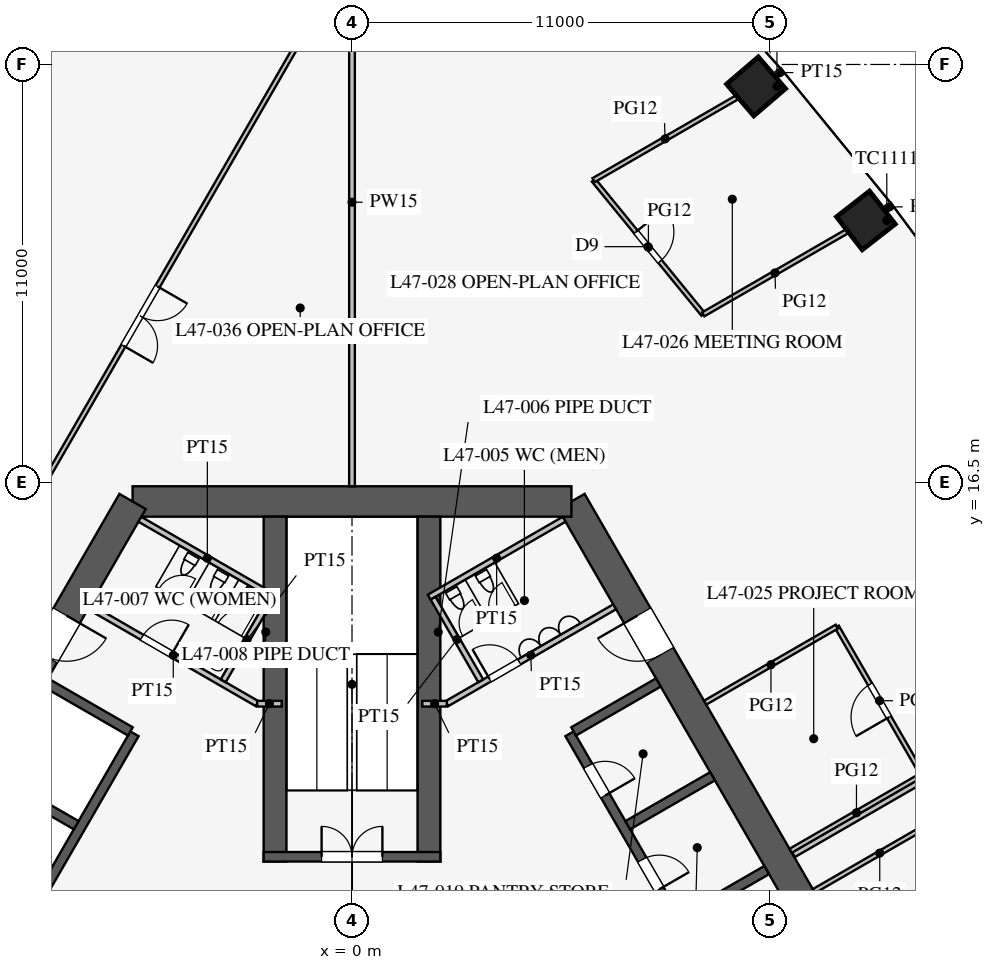
"""IFC4 building model, lengths in metres.
Left out: names, types, materials, properties, quantities, classifications, styles, units other than length and angle.
Written with IfcOpenShell. Run it as: python <this file> out.ifc"""

import sys

from ifc_helpers import new_model, si_unit, direction, frame, frame_2d, origin, origin_2d, place, context, subcontext, project, spatial, rectangle, extrude, element, fill, save


model = new_model("IFC4")
c1 = context("Model", 3, precision=1e-05, world=origin(), true_north=direction((0.0, 1.0)))
c2 = subcontext(c1, "Body", "Model", "MODEL_VIEW")
j1 = project(units=[si_unit("LENGTHUNIT", "METRE"), si_unit("PLANEANGLEUNIT", "RADIAN")], contexts=[c1])
p1 = place(None, origin())
s1 = spatial("IfcSite", under=j1, at=p1, CompositionType="ELEMENT")
p2 = place(p1, origin())
s2 = spatial("IfcBuilding", under=s1, at=p2, CompositionType="ELEMENT")
p3 = place(p2, frame((0.0, 0.0, 206.5)))
s3 = spatial("IfcBuildingStorey", under=s2, at=p3, CompositionType="ELEMENT", Elevation=206.5)
for number, where, z_axis, x_axis in (
    (1, (13.522, 23.396, 0.0), (0.0, 0.0, 1.0), (-0.615, 0.789, 0.0)),
    (2, (10.632, 26.923, 0.0), (0.0, 0.0, 1.0), (-0.651, 0.759, 0.0)),
):
    element("IfcColumn", number, at=place(p3, frame(where, z_axis=z_axis, x_axis=x_axis)), inside=s3, PredefinedType="COLUMN", context=c2, shape_type="SweptSolid", body=[
        extrude(rectangle(XDim=1.1, YDim=1.1, at=origin_2d()), origin(), (0.0, 0.0, 1.0), 4.2),
    ])
p4 = place(p3, frame((16.743, -3.0, 0.0), z_axis=(0.0, 0.0, 1.0), x_axis=(-0.500002442456, 0.866023993627, 0.0)))
e3 = element("IfcWall", 3, at=p4, inside=s3, PredefinedType="SHEAR", context=c2, shape_type="SweptSolid", body=[
    extrude(rectangle(XDim=21.939, YDim=0.8, at=frame_2d((10.97, 0.0))), origin(), (0.0, 0.0, 1.0), 4.2),
])
p5 = place(p4, frame((17.27, 0.0, 0.0)))
e4 = element("IfcOpeningElement", 4, at=p5, cuts=e3, PredefinedType="OPENING", context=c2, shape_type="SweptSolid", body=[
    extrude(rectangle(XDim=1.2, YDim=2.1, at=frame_2d((0.6, 1.05))), frame((0.0, 0.41, 0.0), z_axis=(0.0, -1.0, 0.0), x_axis=(1.0, 0.0, 0.0)), (0.0, 0.0, 1.0), 0.82),
])
p6 = place(p4, frame((3.47, 0.0, 0.0)))
e5 = element("IfcOpeningElement", 5, at=p6, cuts=e3, PredefinedType="OPENING", context=c2, shape_type="SweptSolid", body=[
    extrude(rectangle(XDim=1.2, YDim=2.1, at=frame_2d((0.6, 1.05))), frame((0.0, 0.41, 0.0), z_axis=(0.0, -1.0, 0.0), x_axis=(1.0, 0.0, 0.0)), (0.0, 0.0, 1.0), 0.82),
])
p7 = place(p3, frame((5.773, 16.0, 0.0), z_axis=(0.0, 0.0, 1.0), x_axis=(-1.0, 0.0, 0.0)))
e6 = element("IfcWall", 6, at=p7, inside=s3, PredefinedType="SHEAR", context=c2, shape_type="SweptSolid", body=[
    extrude(rectangle(XDim=11.547, YDim=0.8, at=frame_2d((5.773, 0.0))), origin(), (0.0, 0.0, 1.0), 4.2),
])
p8 = place(p3, frame((-5.773, 16.0, 0.0), z_axis=(0.0, 0.0, 1.0), x_axis=(-0.500002442456, -0.866023993627, 0.0)))
e7 = element("IfcWall", 7, at=p8, inside=s3, PredefinedType="SHEAR", context=c2, shape_type="SweptSolid", body=[
    extrude(rectangle(XDim=21.939, YDim=0.8, at=frame_2d((10.97, 0.0))), origin(), (0.0, 0.0, 1.0), 4.2),
])
p9 = place(p8, frame((17.27, 0.0, 0.0)))
e8 = element("IfcOpeningElement", 8, at=p9, cuts=e7, PredefinedType="OPENING", context=c2, shape_type="SweptSolid", body=[
    extrude(rectangle(XDim=1.2, YDim=2.1, at=frame_2d((0.6, 1.05))), frame((0.0, 0.41, 0.0), z_axis=(0.0, -1.0, 0.0), x_axis=(1.0, 0.0, 0.0)), (0.0, 0.0, 1.0), 0.82),
])
p10 = place(p8, frame((3.47, 0.0, 0.0)))
e9 = element("IfcOpeningElement", 9, at=p10, cuts=e7, PredefinedType="OPENING", context=c2, shape_type="SweptSolid", body=[
    extrude(rectangle(XDim=1.2, YDim=2.1, at=frame_2d((0.6, 1.05))), frame((0.0, 0.41, 0.0), z_axis=(0.0, -1.0, 0.0), x_axis=(1.0, 0.0, 0.0)), (0.0, 0.0, 1.0), 0.82),
])
p11 = place(p3, frame((11.424, 0.014, 0.0), z_axis=(0.0, 0.0, 1.0), x_axis=(-0.500001763848, 0.866024385424, 0.0)))
e10 = element("IfcWall", 10, at=p11, inside=s3, PredefinedType="SHEAR", context=c2, shape_type="SweptSolid", body=[
    extrude(rectangle(XDim=11.4, YDim=0.25, at=frame_2d((5.7, 0.0))), origin(), (0.0, 0.0, 1.0), 4.2),
])
p12 = place(p11, frame((0.975, 0.0, 0.0)))
e11 = element("IfcOpeningElement", 11, at=p12, cuts=e10, PredefinedType="OPENING", context=c2, shape_type="SweptSolid", body=[
    extrude(rectangle(XDim=0.9, YDim=2.1, at=frame_2d((0.45, 1.05))), frame((0.0, 0.135, 0.0), z_axis=(0.0, -1.0, 0.0), x_axis=(1.0, 0.0, 0.0)), (0.0, 0.0, 1.0), 0.27),
])
p13 = place(p11, frame((3.825, 0.0, 0.0)))
e12 = element("IfcOpeningElement", 12, at=p13, cuts=e10, PredefinedType="OPENING", context=c2, shape_type="SweptSolid", body=[
    extrude(rectangle(XDim=0.9, YDim=2.1, at=frame_2d((0.45, 1.05))), frame((0.0, 0.135, 0.0), z_axis=(0.0, -1.0, 0.0), x_axis=(1.0, 0.0, 0.0)), (0.0, 0.0, 1.0), 0.27),
])
p14 = place(p11, frame((6.675, 0.0, 0.0)))
e13 = element("IfcOpeningElement", 13, at=p14, cuts=e10, PredefinedType="OPENING", context=c2, shape_type="SweptSolid", body=[
    extrude(rectangle(XDim=0.9, YDim=2.1, at=frame_2d((0.45, 1.05))), frame((0.0, 0.135, 0.0), z_axis=(0.0, -1.0, 0.0), x_axis=(1.0, 0.0, 0.0)), (0.0, 0.0, 1.0), 0.27),
])
p15 = place(p11, frame((9.525, 0.0, 0.0)))
e14 = element("IfcOpeningElement", 14, at=p15, cuts=e10, PredefinedType="OPENING", context=c2, shape_type="SweptSolid", body=[
    extrude(rectangle(XDim=0.9, YDim=2.1, at=frame_2d((0.45, 1.05))), frame((0.0, 0.135, 0.0), z_axis=(0.0, -1.0, 0.0), x_axis=(1.0, 0.0, 0.0)), (0.0, 0.0, 1.0), 0.27),
])
for number, where, z_axis, x_axis in (
    (15, (8.682, 5.012, 0.0), (0.0, 0.0, 1.0), (0.866, 0.5, 0.0)),
    (16, (7.257, 7.481, 0.0), (0.0, 0.0, 1.0), (0.866, 0.5, 0.0)),
):
    element("IfcWall", number, at=place(p3, frame(where, z_axis=z_axis, x_axis=x_axis)), inside=s3, PredefinedType="SHEAR", context=c2, shape_type="SweptSolid", body=[
        extrude(rectangle(XDim=2.575, YDim=0.25, at=frame_2d((1.288, 0.0))), origin(), (0.0, 0.0, 1.0), 4.2),
    ])
p16 = place(p3, frame((5.832, 9.949, 0.0), z_axis=(0.0, 0.0, 1.0), x_axis=(0.866029291668, 0.499993265928, 0.0)))
e17 = element("IfcWall", 17, at=p16, inside=s3, PredefinedType="SHEAR", context=c2, shape_type="SweptSolid", body=[
    extrude(rectangle(XDim=2.575, YDim=0.25, at=frame_2d((1.288, 0.0))), origin(), (0.0, 0.0, 1.0), 4.2),
])
p17 = place(p3, frame((-5.724, 9.886, 0.0), z_axis=(0.0, 0.0, 1.0), x_axis=(-0.500001763848, -0.866024385424, 0.0)))
e18 = element("IfcWall", 18, at=p17, inside=s3, PredefinedType="SHEAR", context=c2, shape_type="SweptSolid", body=[
    extrude(rectangle(XDim=11.4, YDim=0.25, at=frame_2d((5.7, 0.0))), origin(), (0.0, 0.0, 1.0), 4.2),
])
p18 = place(p17, frame((6.525, 0.0, 0.0)))
e19 = element("IfcOpeningElement", 19, at=p18, cuts=e18, PredefinedType="OPENING", context=c2, shape_type="SweptSolid", body=[
    extrude(rectangle(XDim=1.2, YDim=2.2, at=frame_2d((0.6, 1.1))), frame((0.0, 0.135, 0.0), z_axis=(0.0, -1.0, 0.0), x_axis=(1.0, 0.0, 0.0)), (0.0, 0.0, 1.0), 0.27),
])
p19 = place(p17, frame((9.375, 0.0, 0.0)))
e20 = element("IfcOpeningElement", 20, at=p19, cuts=e18, PredefinedType="OPENING", context=c2, shape_type="SweptSolid", body=[
    extrude(rectangle(XDim=1.2, YDim=2.2, at=frame_2d((0.6, 1.1))), frame((0.0, 0.135, 0.0), z_axis=(0.0, -1.0, 0.0), x_axis=(1.0, 0.0, 0.0)), (0.0, 0.0, 1.0), 0.27),
])
p20 = place(p3, frame((-5.832, 9.949, 0.0), z_axis=(0.0, 0.0, 1.0), x_axis=(-0.866029291668, 0.499993265928, 0.0)))
e21 = element("IfcWall", 21, at=p20, inside=s3, PredefinedType="SHEAR", context=c2, shape_type="SweptSolid", body=[
    extrude(rectangle(XDim=2.575, YDim=0.25, at=frame_2d((1.288, 0.0))), origin(), (0.0, 0.0, 1.0), 4.2),
])
p21 = place(p3, frame((-7.257, 7.481, 0.0), z_axis=(0.0, 0.0, 1.0), x_axis=(-0.866046643894, 0.499963209246, 0.0)))
e22 = element("IfcWall", 22, at=p21, inside=s3, PredefinedType="SHEAR", context=c2, shape_type="SweptSolid", body=[
    extrude(rectangle(XDim=2.575, YDim=0.25, at=frame_2d((1.288, 0.0))), origin(), (0.0, 0.0, 1.0), 4.2),
])
for number, where, z_axis, x_axis in (
    (23, (2.025, 6.525, 0.0), (0.0, 0.0, 1.0), (0.0, 1.0, 0.0)),
    (24, (-2.025, 6.525, 0.0), (0.0, 0.0, 1.0), (0.0, 1.0, 0.0)),
):
    element("IfcWall", number, at=place(p3, frame(where, z_axis=z_axis, x_axis=x_axis)), inside=s3, PredefinedType="SHEAR", context=c2, shape_type="SweptSolid", body=[
        extrude(rectangle(XDim=9.075, YDim=0.6, at=frame_2d((4.538, 0.0))), origin(), (0.0, 0.0, 1.0), 4.2),
    ])
p22 = place(p3, frame((2.325, 6.65, 0.0), z_axis=(0.0, 0.0, 1.0), x_axis=(-1.0, 0.0, 0.0)))
e25 = element("IfcWall", 25, at=p22, inside=s3, PredefinedType="SHEAR", context=c2, shape_type="SweptSolid", body=[
    extrude(rectangle(XDim=4.65, YDim=0.25, at=frame_2d((2.325, 0.0))), origin(), (0.0, 0.0, 1.0), 4.2),
])
p23 = place(p22, frame((1.525, 0.0, 0.0)))
e26 = element("IfcOpeningElement", 26, at=p23, cuts=e25, PredefinedType="OPENING", context=c2, shape_type="SweptSolid", body=[
    extrude(rectangle(XDim=1.6, YDim=2.1, at=frame_2d((0.8, 1.05))), frame((0.0, 0.135, 0.0), z_axis=(0.0, -1.0, 0.0), x_axis=(1.0, 0.0, 0.0)), (0.0, 0.0, 1.0), 0.27),
])
p24 = place(p3, frame((2.495, 10.678, 0.0), z_axis=(0.0, 0.0, 1.0), x_axis=(0.86602216432, 0.500005610874, 0.0)))
e27 = element("IfcWall", 27, at=p24, inside=s3, PredefinedType="PARTITIONING", context=c2, shape_type="SweptSolid", body=[
    extrude(rectangle(XDim=5.1, YDim=0.15, at=frame_2d((2.55, 0.0))), origin(), (0.0, 0.0, 1.0), 4.0),
])
p25 = place(p24, frame((1.3, 0.0, 0.0)))
e28 = element("IfcOpeningElement", 28, at=p25, cuts=e27, PredefinedType="OPENING", context=c2, shape_type="SweptSolid", body=[
    extrude(rectangle(XDim=0.9, YDim=2.1, at=frame_2d((0.45, 1.05))), frame((0.0, 0.085, 0.0), z_axis=(0.0, -1.0, 0.0), x_axis=(1.0, 0.0, 0.0)), (0.0, 0.0, 1.0), 0.17),
])
p26 = place(p3, frame((-2.495, 10.678, 0.0), z_axis=(0.0, 0.0, 1.0), x_axis=(-0.86602216432, 0.500005610874, 0.0)))
e29 = element("IfcWall", 29, at=p26, inside=s3, PredefinedType="PARTITIONING", context=c2, shape_type="SweptSolid", body=[
    extrude(rectangle(XDim=5.1, YDim=0.15, at=frame_2d((2.55, 0.0))), origin(), (0.0, 0.0, 1.0), 4.0),
])
p27 = place(p26, frame((2.6, 0.0, 0.0)))
e30 = element("IfcOpeningElement", 30, at=p27, cuts=e29, PredefinedType="OPENING", context=c2, shape_type="SweptSolid", body=[
    extrude(rectangle(XDim=0.9, YDim=2.1, at=frame_2d((0.45, 1.05))), frame((0.0, 0.085, 0.0), z_axis=(0.0, -1.0, 0.0), x_axis=(1.0, 0.0, 0.0)), (0.0, 0.0, 1.0), 0.17),
])
for number, where, z_axis, x_axis in (
    (31, (2.495, 10.678, 0.0), (0.0, 0.0, 1.0), (-1.0, 0.0, 0.0)),
    (32, (-2.495, 10.678, 0.0), (0.0, 0.0, 1.0), (1.0, 0.0, 0.0)),
):
    element("IfcWall", number, at=place(p3, frame(where, z_axis=z_axis, x_axis=x_axis)), inside=s3, PredefinedType="PARTITIONING", context=c2, shape_type="SweptSolid", body=[
        extrude(rectangle(XDim=0.645, YDim=0.15, at=frame_2d((0.323, 0.0))), origin(), (0.0, 0.0, 1.0), 4.0),
    ])
p28 = place(p3, frame((2.031, 13.482, 0.0), z_axis=(0.0, 0.0, 1.0), x_axis=(0.866050731258, 0.499956128963, 0.0)))
e33 = element("IfcWall", 33, at=p28, inside=s3, PredefinedType="PARTITIONING", context=c2, shape_type="SweptSolid", body=[
    extrude(rectangle(XDim=4.1, YDim=0.15, at=frame_2d((2.05, 0.0))), origin(), (0.0, 0.0, 1.0), 4.0),
])
p29 = place(p3, frame((3.389, 11.281, 0.0), z_axis=(0.0, 0.0, 1.0), x_axis=(-0.499989096993, 0.866031698547, 0.0)))
e34 = element("IfcWall", 34, at=p29, inside=s3, PredefinedType="PARTITIONING", context=c2, shape_type="SweptSolid", body=[
    extrude(rectangle(XDim=2.51, YDim=0.15, at=frame_2d((1.255, 0.0))), origin(), (0.0, 0.0, 1.0), 4.0),
])
p30 = place(p3, frame((-2.031, 13.482, 0.0), z_axis=(0.0, 0.0, 1.0), x_axis=(-0.866050731258, 0.499956128963, 0.0)))
e35 = element("IfcWall", 35, at=p30, inside=s3, PredefinedType="PARTITIONING", context=c2, shape_type="SweptSolid", body=[
    extrude(rectangle(XDim=4.1, YDim=0.15, at=frame_2d((2.05, 0.0))), origin(), (0.0, 0.0, 1.0), 4.0),
])
p31 = place(p3, frame((-3.389, 11.281, 0.0), z_axis=(0.0, 0.0, 1.0), x_axis=(0.499989096993, 0.866031698547, 0.0)))
e36 = element("IfcWall", 36, at=p31, inside=s3, PredefinedType="PARTITIONING", context=c2, shape_type="SweptSolid", body=[
    extrude(rectangle(XDim=2.51, YDim=0.15, at=frame_2d((1.255, 0.0))), origin(), (0.0, 0.0, 1.0), 4.0),
])
p32 = place(p3, frame((0.0, 16.4, 0.0), z_axis=(0.0, 0.0, 1.0), x_axis=(0.0, 1.0, 0.0)))
e37 = element("IfcWall", 37, at=p32, inside=s3, PredefinedType="PARTITIONING", context=c2, shape_type="SweptSolid", body=[
    extrude(rectangle(XDim=14.95, YDim=0.15, at=frame_2d((7.475, 0.0))), origin(), (0.0, 0.0, 1.0), 2.4),
])
p33 = place(p3, frame((11.613, 6.705, 0.0), z_axis=(0.0, 0.0, 1.0), x_axis=(0.86603333284, 0.499986266222, 0.0)))
e38 = element("IfcWall", 38, at=p33, inside=s3, PredefinedType="PARTITIONING", context=c2, shape_type="SweptSolid", body=[
    extrude(rectangle(XDim=10.361, YDim=0.15, at=frame_2d((5.18, 0.0))), origin(), (0.0, 0.0, 1.0), 3.3),
])
p34 = place(p3, frame((15.006, 8.808, 0.0), z_axis=(0.0, 0.0, 1.0), x_axis=(-0.500013631625, 0.866017533419, 0.0)))
e39 = element("IfcWall", 39, at=p34, inside=s3, PredefinedType="PARTITIONING", context=c2, shape_type="SweptSolid", body=[
    extrude(rectangle(XDim=4.5, YDim=0.12, at=frame_2d((2.25, 0.0))), origin(), (0.0, 0.0, 1.0), 2.9),
])
p35 = place(p34, frame((1.75, 0.0, 0.15)))
e40 = element("IfcOpeningElement", 40, at=p35, cuts=e39, PredefinedType="OPENING", context=c2, shape_type="SweptSolid", body=[
    extrude(rectangle(XDim=1.0, YDim=2.1, at=frame_2d((0.5, 1.05))), frame((0.0, 0.07, 0.0), z_axis=(0.0, -1.0, 0.0), x_axis=(1.0, 0.0, 0.0)), (0.0, 0.0, 1.0), 0.14),
])
for number, where, z_axis, x_axis in (
    (41, (11.542, 6.808, 0.0), (0.0, 0.0, 1.0), (0.866, 0.5, 0.0)),
    (42, (9.292, 10.705, 0.0), (0.0, 0.0, 1.0), (0.866, 0.5, 0.0)),
    (43, (12.155, 5.747, 0.0), (0.0, 0.0, 1.0), (0.866, 0.5, 0.0)),
):
    element("IfcWall", number, at=place(p3, frame(where, z_axis=z_axis, x_axis=x_axis)), inside=s3, PredefinedType="PARTITIONING", context=c2, shape_type="SweptSolid", body=[
        extrude(rectangle(XDim=4.0, YDim=0.12, at=frame_2d((2.0, 0.0))), origin(), (0.0, 0.0, 1.0), 2.9),
    ])
p36 = place(p3, frame((14.063, 23.708, 0.0), z_axis=(0.0, 0.0, 1.0), x_axis=(0.865614066289, 0.500711781609, 0.0)))
e44 = element("IfcWall", 44, at=p36, inside=s3, PredefinedType="PARTITIONING", context=c2, shape_type="SweptSolid", body=[
    extrude(rectangle(XDim=0.178, YDim=0.15, at=frame_2d((0.089, 0.0))), origin(), (0.0, 0.0, 1.0), 2.9),
])
p37 = place(p3, frame((11.191, 27.246, 0.0), z_axis=(0.0, 0.0, 1.0), x_axis=(0.865836232376, 0.500327511442, 0.0)))
e45 = element("IfcWall", 45, at=p37, inside=s3, PredefinedType="PARTITIONING", context=c2, shape_type="SweptSolid", body=[
    extrude(rectangle(XDim=0.163, YDim=0.15, at=frame_2d((0.082, 0.0))), origin(), (0.0, 0.0, 1.0), 2.9),
])
p38 = place(p3, frame((9.242, 20.924, 0.0), z_axis=(0.0, 0.0, 1.0), x_axis=(-0.632765292047, 0.774343647989, 0.0)))
e46 = element("IfcWall", 46, at=p38, inside=s3, PredefinedType="PARTITIONING", context=c2, shape_type="SweptSolid", body=[
    extrude(rectangle(XDim=4.559, YDim=0.12, at=frame_2d((2.28, 0.0))), origin(), (0.0, 0.0, 1.0), 2.9),
])
p39 = place(p38, frame((1.8, 0.0, 0.15)))
e47 = element("IfcOpeningElement", 47, at=p39, cuts=e46, PredefinedType="OPENING", context=c2, shape_type="SweptSolid", body=[
    extrude(rectangle(XDim=1.0, YDim=2.1, at=frame_2d((0.5, 1.05))), frame((0.0, 0.07, 0.0), z_axis=(0.0, -1.0, 0.0), x_axis=(1.0, 0.0, 0.0)), (0.0, 0.0, 1.0), 0.14),
])
p40 = place(p3, frame((9.242, 20.924, 0.0), z_axis=(0.0, 0.0, 1.0), x_axis=(0.866010142069, 0.500026433136, 0.0)))
e48 = element("IfcWall", 48, at=p40, inside=s3, PredefinedType="PARTITIONING", context=c2, shape_type="SweptSolid", body=[
    extrude(rectangle(XDim=4.357, YDim=0.12, at=frame_2d((2.178, 0.0))), origin(), (0.0, 0.0, 1.0), 2.9),
])
p41 = place(p3, frame((6.357, 24.455, 0.0), z_axis=(0.0, 0.0, 1.0), x_axis=(0.866025625133, 0.499999616612, 0.0)))
e49 = element("IfcWall", 49, at=p41, inside=s3, PredefinedType="PARTITIONING", context=c2, shape_type="SweptSolid", body=[
    extrude(rectangle(XDim=4.346, YDim=0.12, at=frame_2d((2.173, 0.0))), origin(), (0.0, 0.0, 1.0), 2.9),
])
p42 = place(p3, frame((-0.016, 30.491, 0.0), z_axis=(0.0, 0.0, 1.0), x_axis=(-0.50000091641, -0.866024874695, 0.0)))
e50 = element("IfcWall", 50, at=p42, inside=s3, PredefinedType="PARTITIONING", context=c2, shape_type="SweptSolid", body=[
    extrude(rectangle(XDim=52.796, YDim=0.12, at=frame_2d((26.398, 0.0))), origin(), (0.0, 0.0, 1.0), 2.9),
])
p43 = place(p42, frame((10.2, 0.0, 0.15)))
e51 = element("IfcOpeningElement", 51, at=p43, cuts=e50, PredefinedType="OPENING", context=c2, shape_type="SweptSolid", body=[
    extrude(rectangle(XDim=1.8, YDim=2.1, at=frame_2d((0.9, 1.05))), frame((0.0, 0.07, 0.0), z_axis=(0.0, -1.0, 0.0), x_axis=(1.0, 0.0, 0.0)), (0.0, 0.0, 1.0), 0.14),
])
p44 = place(p42, frame((40.8, 0.0, 0.15)))
e52 = element("IfcOpeningElement", 52, at=p44, cuts=e50, PredefinedType="OPENING", context=c2, shape_type="SweptSolid", body=[
    extrude(rectangle(XDim=1.8, YDim=2.1, at=frame_2d((0.9, 1.05))), frame((0.0, 0.07, 0.0), z_axis=(0.0, -1.0, 0.0), x_axis=(1.0, 0.0, 0.0)), (0.0, 0.0, 1.0), 0.14),
])
p45 = place(p25, origin())
e53 = element("IfcDoor", 53, at=p45, inside=s3, OperationType="SINGLE_SWING_LEFT", PredefinedType="DOOR", context=c2, shape_type="SweptSolid", body=[
    extrude(rectangle(XDim=0.9, YDim=2.1, at=frame_2d((0.45, 1.05))), frame((0.0, 0.025, 0.0), z_axis=(0.0, -1.0, 0.0), x_axis=(1.0, 0.0, 0.0)), (0.0, 0.0, 1.0), 0.05),
])
fill(e28, e53)
p46 = place(p27, frame((0.9, 0.0, 0.0), z_axis=(0.0, 0.0, 1.0), x_axis=(-1.0, 0.0, 0.0)))
e54 = element("IfcDoor", 54, at=p46, inside=s3, OperationType="SINGLE_SWING_RIGHT", PredefinedType="DOOR", context=c2, shape_type="SweptSolid", body=[
    extrude(rectangle(XDim=0.9, YDim=2.1, at=frame_2d((0.45, 1.05))), frame((0.0, 0.025, 0.0), z_axis=(0.0, -1.0, 0.0), x_axis=(1.0, 0.0, 0.0)), (0.0, 0.0, 1.0), 0.05),
])
fill(e30, e54)
p47 = place(p23, frame((1.6, 0.0, 0.0), z_axis=(0.0, 0.0, 1.0), x_axis=(-1.0, 0.0, 0.0)))
e55 = element("IfcDoor", 55, at=p47, inside=s3, OperationType="DOUBLE_DOOR_SINGLE_SWING", PredefinedType="DOOR", context=c2, shape_type="SweptSolid", body=[
    extrude(rectangle(XDim=1.6, YDim=2.1, at=frame_2d((0.8, 1.05))), frame((0.0, 0.025, 0.0), z_axis=(0.0, -1.0, 0.0), x_axis=(1.0, 0.0, 0.0)), (0.0, 0.0, 1.0), 0.05),
])
fill(e26, e55)
p48 = place(p5, origin())
e56 = element("IfcDoor", 56, at=p48, inside=s3, OperationType="SINGLE_SWING_RIGHT", PredefinedType="DOOR", context=c2, shape_type="SweptSolid", body=[
    extrude(rectangle(XDim=1.2, YDim=2.1, at=frame_2d((0.6, 1.05))), frame((0.0, 0.025, 0.0), z_axis=(0.0, -1.0, 0.0), x_axis=(1.0, 0.0, 0.0)), (0.0, 0.0, 1.0), 0.05),
])
fill(e4, e56)
p49 = place(p10, origin())
e57 = element("IfcDoor", 57, at=p49, inside=s3, OperationType="SINGLE_SWING_LEFT", PredefinedType="DOOR", context=c2, shape_type="SweptSolid", body=[
    extrude(rectangle(XDim=1.2, YDim=2.1, at=frame_2d((0.6, 1.05))), frame((0.0, 0.025, 0.0), z_axis=(0.0, -1.0, 0.0), x_axis=(1.0, 0.0, 0.0)), (0.0, 0.0, 1.0), 0.05),
])
fill(e9, e57)
p50 = place(p14, frame((0.9, 0.0, 0.0), z_axis=(0.0, 0.0, 1.0), x_axis=(-1.0, 0.0, 0.0)))
e58 = element("IfcDoor", 58, at=p50, inside=s3, OperationType="SINGLE_SWING_RIGHT", PredefinedType="DOOR", context=c2, shape_type="SweptSolid", body=[
    extrude(rectangle(XDim=0.9, YDim=2.1, at=frame_2d((0.45, 1.05))), frame((0.0, 0.025, 0.0), z_axis=(0.0, -1.0, 0.0), x_axis=(1.0, 0.0, 0.0)), (0.0, 0.0, 1.0), 0.05),
])
fill(e13, e58)
p51 = place(p15, frame((0.9, 0.0, 0.0), z_axis=(0.0, 0.0, 1.0), x_axis=(-1.0, 0.0, 0.0)))
e59 = element("IfcDoor", 59, at=p51, inside=s3, OperationType="SINGLE_SWING_RIGHT", PredefinedType="DOOR", context=c2, shape_type="SweptSolid", body=[
    extrude(rectangle(XDim=0.9, YDim=2.1, at=frame_2d((0.45, 1.05))), frame((0.0, 0.025, 0.0), z_axis=(0.0, -1.0, 0.0), x_axis=(1.0, 0.0, 0.0)), (0.0, 0.0, 1.0), 0.05),
])
fill(e14, e59)
p52 = place(p35, origin())
e60 = element("IfcDoor", 60, at=p52, inside=s3, OperationType="SINGLE_SWING_LEFT", PredefinedType="DOOR", context=c2, shape_type="SweptSolid", body=[
    extrude(rectangle(XDim=1.0, YDim=2.1, at=frame_2d((0.5, 1.05))), frame((0.0, 0.025, 0.0), z_axis=(0.0, -1.0, 0.0), x_axis=(1.0, 0.0, 0.0)), (0.0, 0.0, 1.0), 0.05),
])
fill(e40, e60)
p53 = place(p39, frame((1.0, 0.0, 0.0), z_axis=(0.0, 0.0, 1.0), x_axis=(-1.0, 0.0, 0.0)))
e61 = element("IfcDoor", 61, at=p53, inside=s3, OperationType="SINGLE_SWING_LEFT", PredefinedType="DOOR", context=c2, shape_type="SweptSolid", body=[
    extrude(rectangle(XDim=1.0, YDim=2.1, at=frame_2d((0.5, 1.05))), frame((0.0, 0.025, 0.0), z_axis=(0.0, -1.0, 0.0), x_axis=(1.0, 0.0, 0.0)), (0.0, 0.0, 1.0), 0.05),
])
fill(e47, e61)
p54 = place(p43, origin())
e62 = element("IfcDoor", 62, at=p54, inside=s3, OperationType="DOUBLE_DOOR_SINGLE_SWING", PredefinedType="DOOR", context=c2, shape_type="SweptSolid", body=[
    extrude(rectangle(XDim=1.8, YDim=2.1, at=frame_2d((0.9, 1.05))), frame((0.0, 0.025, 0.0), z_axis=(0.0, -1.0, 0.0), x_axis=(1.0, 0.0, 0.0)), (0.0, 0.0, 1.0), 0.05),
])
fill(e51, e62)
save(model, sys.argv[1])
